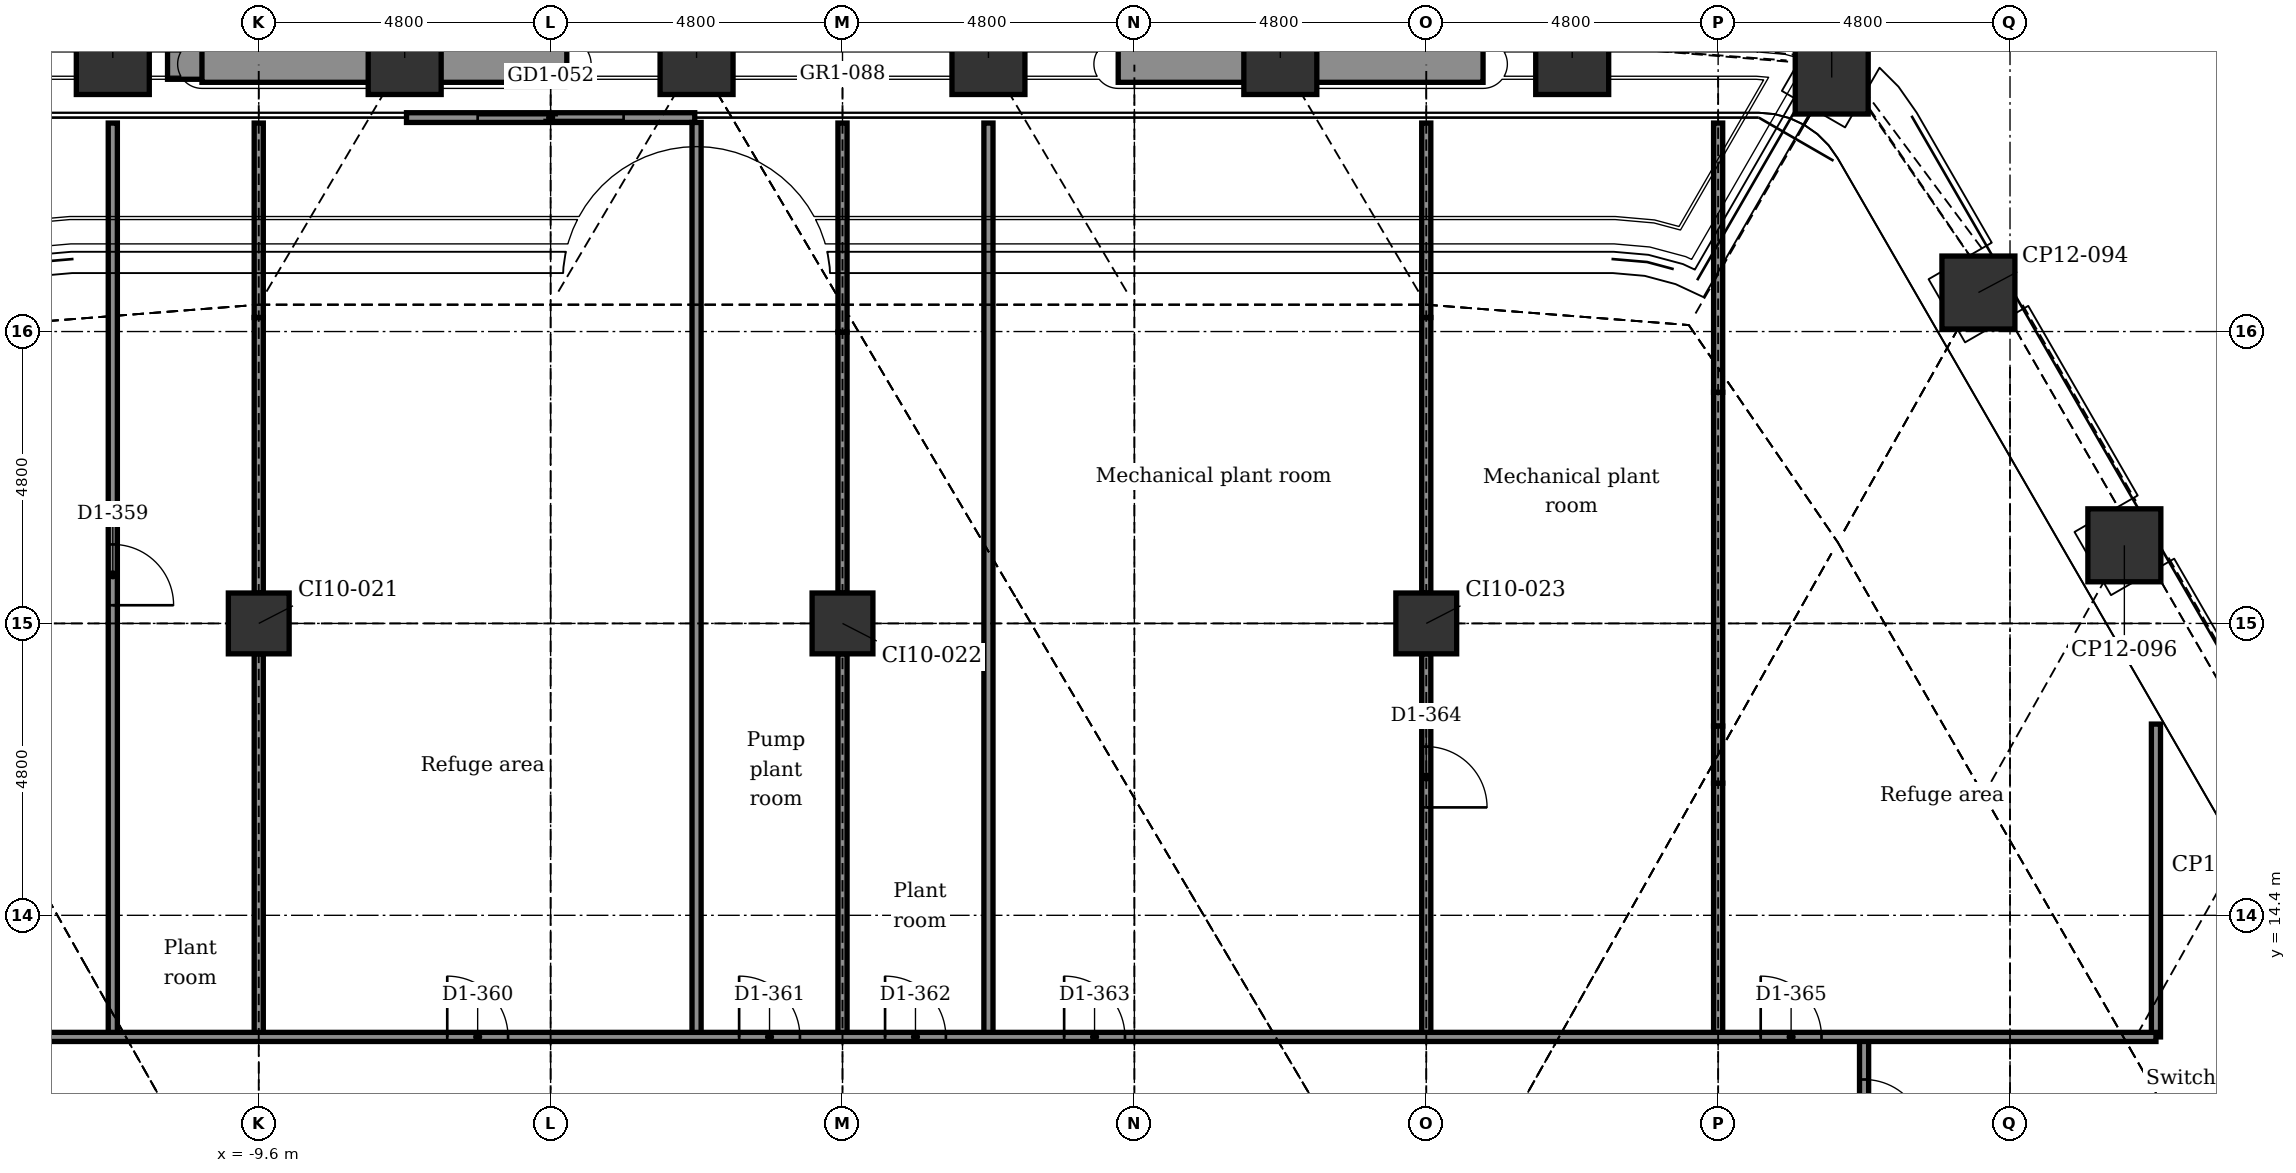
"""IFC4 building model, lengths in metres.
Left out: names, types, materials, properties, quantities, classifications, styles, units other than length and angle.
Written with IfcOpenShell. Run it as: python <this file> out.ifc"""

import sys

from ifc_helpers import new_model, si_unit, direction, frame, frame_2d, origin, origin_2d, place, context, subcontext, project, spatial, rectangle, extrude, element, fill, save


model = new_model("IFC4")
c1 = context("Model", 3, precision=1e-05, world=origin(), true_north=direction((0.0, 1.0)))
c2 = subcontext(c1, "Body", "Model", "MODEL_VIEW")
j1 = project(units=[si_unit("LENGTHUNIT", "METRE"), si_unit("PLANEANGLEUNIT", "RADIAN")], contexts=[c1])
p1 = place(None, origin())
s1 = spatial("IfcSite", under=j1, at=p1, CompositionType="ELEMENT")
p2 = place(p1, origin())
s2 = spatial("IfcBuilding", under=s1, at=p2, CompositionType="ELEMENT")
p3 = place(p2, frame((0.0, 0.0, 127.4)))
s3 = spatial("IfcBuildingStorey", under=s2, at=p3, CompositionType="ELEMENT", Elevation=127.4)
for number, where, z_axis, x_axis in (
    (1, (-12.0, 28.499, -0.3), (0.0, 0.0, 1.0), (1.0, 0.0, 0.0)),
    (2, (-7.2, 28.499, -0.3), (0.0, 0.0, 1.0), (1.0, 0.0, 0.0)),
    (3, (-2.4, 28.499, -0.3), (0.0, 0.0, 1.0), (1.0, 0.0, 0.0)),
    (4, (2.4, 28.499, -0.3), (0.0, 0.0, 1.0), (1.0, 0.0, 0.0)),
    (5, (7.2, 28.499, -0.3), (0.0, 0.0, 1.0), (1.0, 0.0, 0.0)),
    (6, (12.0, 28.499, -0.3), (0.0, 0.0, 1.0), (1.0, 0.0, 0.0)),
    (7, (16.268, 28.177, -0.3), (0.0, 0.0, 1.0), (0.5, 0.866, 0.0)),
    (8, (18.68, 24.642, -0.3), (0.0, 0.0, 1.0), (0.866, 0.5, 0.0)),
    (9, (21.08, 20.485, -0.3), (0.0, 0.0, 1.0), (0.866, 0.5, 0.0)),
):
    element("IfcColumn", number, at=place(p3, frame(where, z_axis=z_axis, x_axis=x_axis)), inside=s3, PredefinedType="COLUMN", context=c2, shape_type="SweptSolid", body=[
        extrude(rectangle(XDim=1.2, YDim=1.2, at=origin_2d()), origin(), (0.0, 0.0, 1.0), 6.15),
    ])
for number, where, z_axis, x_axis in (
    (10, (-9.6, 19.2, -0.3), (0.0, 0.0, 1.0), (1.0, 0.0, 0.0)),
    (11, (0.0, 19.2, -0.3), (0.0, 0.0, 1.0), (1.0, 0.0, 0.0)),
    (12, (9.6, 19.2, -0.3), (0.0, 0.0, 1.0), (1.0, 0.0, 0.0)),
):
    element("IfcColumn", number, at=place(p3, frame(where, z_axis=z_axis, x_axis=x_axis)), inside=s3, PredefinedType="COLUMN", context=c2, shape_type="SweptSolid", body=[
        extrude(rectangle(XDim=1.0, YDim=1.0, at=origin_2d()), origin(), (0.0, 0.0, 1.0), 6.15),
    ])
p4 = place(p3, frame((-7.17, 27.519, 0.0), z_axis=(0.0, 0.0, 1.0), x_axis=(1.0, 0.0, 0.0)))
e13 = element("IfcWall", 13, at=p4, inside=s3, PredefinedType="PARTITIONING", context=c2, shape_type="SweptSolid", body=[
    extrude(rectangle(XDim=4.74, YDim=0.16, at=frame_2d((2.37, 0.0))), origin(), (0.0, 0.0, 1.0), 5.7),
])
p5 = place(p4, frame((1.17, 0.0, 0.0)))
e14 = element("IfcOpeningElement", 14, at=p5, cuts=e13, PredefinedType="OPENING", context=c2, shape_type="SweptSolid", body=[
    extrude(rectangle(XDim=2.4, YDim=2.4, at=frame_2d((1.2, 1.2))), frame((0.0, 0.09, 0.0), z_axis=(0.0, -1.0, 0.0), x_axis=(1.0, 0.0, 0.0)), (0.0, 0.0, 1.0), 0.18),
])
p6 = place(p3, frame((-11.1, 28.448, 0.0), z_axis=(0.0, 0.0, 1.0), x_axis=(1.0, 0.0, 0.0)))
e15 = element("IfcWall", 15, at=p6, inside=s3, PredefinedType="USERDEFINED", context=c2, shape_type="SweptSolid", body=[
    extrude(rectangle(XDim=3.0, YDim=0.6, at=frame_2d((1.5, 0.0))), origin(), (0.0, 0.0, 1.0), 0.7),
])
for number, where, z_axis, x_axis in (
    (16, (-10.534, 28.398, 6.0), (0.0, 0.0, 1.0), (1.0, 0.0, 0.0)),
    (17, (4.534, 28.398, 6.0), (0.0, 0.0, 1.0), (1.0, 0.0, 0.0)),
):
    element("IfcWall", number, at=place(p3, frame(where, z_axis=z_axis, x_axis=x_axis)), inside=s3, PredefinedType="USERDEFINED", context=c2, shape_type="SweptSolid", body=[
        extrude(rectangle(XDim=6.0, YDim=0.6, at=frame_2d((3.0, 0.0))), origin(), (0.0, 0.0, 1.0), 0.7),
    ])
p7 = place(p3, frame((21.6, 12.4, 0.0), z_axis=(0.0, 0.0, 1.0), x_axis=(0.0, 1.0, 0.0)))
e18 = element("IfcWall", 18, at=p7, inside=s3, PredefinedType="PARTITIONING", context=c2, shape_type="SweptSolid", body=[
    extrude(rectangle(XDim=5.145, YDim=0.15, at=frame_2d((2.572, 0.0))), origin(), (0.0, 0.0, 1.0), 5.85),
])
p8 = place(p3, frame((16.8, 3.95, 0.0), z_axis=(0.0, 0.0, 1.0), x_axis=(0.0, 1.0, 0.0)))
e19 = element("IfcWall", 19, at=p8, inside=s3, PredefinedType="PARTITIONING", context=c2, shape_type="SweptSolid", body=[
    extrude(rectangle(XDim=8.45, YDim=0.15, at=frame_2d((4.225, 0.0))), origin(), (0.0, 0.0, 1.0), 5.85),
])
p9 = place(p8, frame((2.25, 0.0, 0.0)))
e20 = element("IfcOpeningElement", 20, at=p9, cuts=e19, PredefinedType="OPENING", context=c2, shape_type="SweptSolid", body=[
    extrude(rectangle(XDim=1.0, YDim=2.1, at=frame_2d((0.5, 1.05))), frame((0.0, 0.085, 0.0), z_axis=(0.0, -1.0, 0.0), x_axis=(1.0, 0.0, 0.0)), (0.0, 0.0, 1.0), 0.17),
])
p10 = place(p8, frame((6.75, 0.0, 0.0)))
e21 = element("IfcOpeningElement", 21, at=p10, cuts=e19, PredefinedType="OPENING", context=c2, shape_type="SweptSolid", body=[
    extrude(rectangle(XDim=1.0, YDim=2.1, at=frame_2d((0.5, 1.05))), frame((0.0, 0.085, 0.0), z_axis=(0.0, -1.0, 0.0), x_axis=(1.0, 0.0, 0.0)), (0.0, 0.0, 1.0), 0.17),
])
p11 = place(p3, frame((14.4, 17.512, 0.0), z_axis=(0.0, 0.0, 1.0), x_axis=(0.0, 1.0, 0.0)))
e22 = element("IfcWall", 22, at=p11, inside=s3, PredefinedType="PARTITIONING", context=c2, shape_type="SweptSolid", body=[
    extrude(rectangle(XDim=5.489, YDim=0.15, at=frame_2d((2.745, 0.0))), origin(), (0.0, 0.0, 1.0), 5.54),
])
p12 = place(p3, frame((14.4, 12.4, 0.0), z_axis=(0.0, 0.0, 1.0), x_axis=(0.0, 1.0, 0.0)))
e23 = element("IfcWall", 23, at=p12, inside=s3, PredefinedType="PARTITIONING", context=c2, shape_type="SweptSolid", body=[
    extrude(rectangle(XDim=4.173, YDim=0.15, at=frame_2d((2.087, 0.0))), origin(), (0.0, 0.0, 1.0), 5.54),
])
p13 = place(p3, frame((14.4, 16.573, 0.0), z_axis=(0.0, 0.0, 1.0), x_axis=(0.0, 1.0, 0.0)))
e24 = element("IfcWall", 24, at=p13, inside=s3, PredefinedType="PARTITIONING", context=c2, shape_type="SweptSolid", body=[
    extrude(rectangle(XDim=0.939, YDim=0.15, at=frame_2d((0.469, 0.0))), origin(), (0.0, 0.0, 1.0), 5.7),
])
p14 = place(p3, frame((14.4, 23.001, 0.0), z_axis=(0.0, 0.0, 1.0), x_axis=(0.0, 1.0, 0.0)))
e25 = element("IfcWall", 25, at=p14, inside=s3, PredefinedType="PARTITIONING", context=c2, shape_type="SweptSolid", body=[
    extrude(rectangle(XDim=4.427, YDim=0.15, at=frame_2d((2.213, 0.0))), origin(), (0.0, 0.0, 1.0), 5.7),
])
p15 = place(p3, frame((9.6, 12.4, 0.0), z_axis=(0.0, 0.0, 1.0), x_axis=(0.0, 1.0, 0.0)))
e26 = element("IfcWall", 26, at=p15, inside=s3, PredefinedType="PARTITIONING", context=c2, shape_type="SweptSolid", body=[
    extrude(rectangle(XDim=6.3, YDim=0.15, at=frame_2d((3.15, 0.0))), origin(), (0.0, 0.0, 1.0), 5.443),
])
p16 = place(p15, frame((3.775, 0.0, 0.0)))
e27 = element("IfcOpeningElement", 27, at=p16, cuts=e26, PredefinedType="OPENING", context=c2, shape_type="SweptSolid", body=[
    extrude(rectangle(XDim=1.0, YDim=2.1, at=frame_2d((0.5, 1.05))), frame((0.0, 0.085, 0.0), z_axis=(0.0, -1.0, 0.0), x_axis=(1.0, 0.0, 0.0)), (0.0, 0.0, 1.0), 0.17),
])
p17 = place(p3, frame((9.6, 19.7, 0.0), z_axis=(0.0, 0.0, 1.0), x_axis=(0.0, 1.0, 0.0)))
e28 = element("IfcWall", 28, at=p17, inside=s3, PredefinedType="PARTITIONING", context=c2, shape_type="SweptSolid", body=[
    extrude(rectangle(XDim=4.531, YDim=0.15, at=frame_2d((2.265, 0.0))), origin(), (0.0, 0.0, 1.0), 5.54),
])
p18 = place(p3, frame((9.6, 24.231, 0.0), z_axis=(0.0, 0.0, 1.0), x_axis=(0.0, 1.0, 0.0)))
e29 = element("IfcWall", 29, at=p18, inside=s3, PredefinedType="PARTITIONING", context=c2, shape_type="SweptSolid", body=[
    extrude(rectangle(XDim=3.198, YDim=0.15, at=frame_2d((1.599, 0.0))), origin(), (0.0, 0.0, 1.0), 5.7),
])
p19 = place(p3, frame((2.4, 12.4, 0.0), z_axis=(0.0, 0.0, 1.0), x_axis=(0.0, 1.0, 0.0)))
e30 = element("IfcWall", 30, at=p19, inside=s3, PredefinedType="PARTITIONING", context=c2, shape_type="SweptSolid", body=[
    extrude(rectangle(XDim=15.029, YDim=0.15, at=frame_2d((7.514, 0.0))), origin(), (0.0, 0.0, 1.0), 5.7),
])
p20 = place(p3, frame((0.0, 12.4, 0.0), z_axis=(0.0, 0.0, 1.0), x_axis=(0.0, 1.0, 0.0)))
e31 = element("IfcWall", 31, at=p20, inside=s3, PredefinedType="PARTITIONING", context=c2, shape_type="SweptSolid", body=[
    extrude(rectangle(XDim=6.3, YDim=0.15, at=frame_2d((3.15, 0.0))), origin(), (0.0, 0.0, 1.0), 5.443),
])
p21 = place(p3, frame((0.0, 19.7, 0.0), z_axis=(0.0, 0.0, 1.0), x_axis=(0.0, 1.0, 0.0)))
e32 = element("IfcWall", 32, at=p21, inside=s3, PredefinedType="PARTITIONING", context=c2, shape_type="SweptSolid", body=[
    extrude(rectangle(XDim=4.291, YDim=0.15, at=frame_2d((2.145, 0.0))), origin(), (0.0, 0.0, 1.0), 5.54),
])
p22 = place(p3, frame((0.0, 23.99, 0.0), z_axis=(0.0, 0.0, 1.0), x_axis=(0.0, 1.0, 0.0)))
e33 = element("IfcWall", 33, at=p22, inside=s3, PredefinedType="PARTITIONING", context=c2, shape_type="SweptSolid", body=[
    extrude(rectangle(XDim=3.438, YDim=0.15, at=frame_2d((1.719, 0.0))), origin(), (0.0, 0.0, 1.0), 5.7),
])
p23 = place(p3, frame((-2.4, 12.4, 0.0), z_axis=(0.0, 0.0, 1.0), x_axis=(0.0, 1.0, 0.0)))
e34 = element("IfcWall", 34, at=p23, inside=s3, PredefinedType="PARTITIONING", context=c2, shape_type="SweptSolid", body=[
    extrude(rectangle(XDim=15.039, YDim=0.15, at=frame_2d((7.519, 0.0))), origin(), (0.0, 0.0, 1.0), 5.7),
])
p24 = place(p3, frame((-9.6, 12.4, 0.0), z_axis=(0.0, 0.0, 1.0), x_axis=(0.0, 1.0, 0.0)))
e35 = element("IfcWall", 35, at=p24, inside=s3, PredefinedType="PARTITIONING", context=c2, shape_type="SweptSolid", body=[
    extrude(rectangle(XDim=6.3, YDim=0.15, at=frame_2d((3.15, 0.0))), origin(), (0.0, 0.0, 1.0), 5.443),
])
p25 = place(p3, frame((-9.6, 19.7, 0.0), z_axis=(0.0, 0.0, 1.0), x_axis=(0.0, 1.0, 0.0)))
e36 = element("IfcWall", 36, at=p25, inside=s3, PredefinedType="PARTITIONING", context=c2, shape_type="SweptSolid", body=[
    extrude(rectangle(XDim=4.531, YDim=0.15, at=frame_2d((2.265, 0.0))), origin(), (0.0, 0.0, 1.0), 5.54),
])
p26 = place(p3, frame((-9.6, 24.231, 0.0), z_axis=(0.0, 0.0, 1.0), x_axis=(0.0, 1.0, 0.0)))
e37 = element("IfcWall", 37, at=p26, inside=s3, PredefinedType="PARTITIONING", context=c2, shape_type="SweptSolid", body=[
    extrude(rectangle(XDim=3.198, YDim=0.15, at=frame_2d((1.599, 0.0))), origin(), (0.0, 0.0, 1.0), 5.7),
])
p27 = place(p3, frame((-12.0, 12.4, 0.0), z_axis=(0.0, 0.0, 1.0), x_axis=(0.0, 1.0, 0.0)))
e38 = element("IfcWall", 38, at=p27, inside=s3, PredefinedType="PARTITIONING", context=c2, shape_type="SweptSolid", body=[
    extrude(rectangle(XDim=15.029, YDim=0.15, at=frame_2d((7.514, 0.0))), origin(), (0.0, 0.0, 1.0), 5.7),
])
p28 = place(p27, frame((7.099, 0.0, 0.0)))
e39 = element("IfcOpeningElement", 39, at=p28, cuts=e38, PredefinedType="OPENING", context=c2, shape_type="SweptSolid", body=[
    extrude(rectangle(XDim=1.0, YDim=2.1, at=frame_2d((0.5, 1.05))), frame((0.0, 0.085, 0.0), z_axis=(0.0, -1.0, 0.0), x_axis=(1.0, 0.0, 0.0)), (0.0, 0.0, 1.0), 0.17),
])
p29 = place(p3, frame((-21.6, 12.4, 0.0), z_axis=(0.0, 0.0, 1.0), x_axis=(1.0, 0.0, 0.0)))
e40 = element("IfcWall", 40, at=p29, inside=s3, PredefinedType="PARTITIONING", context=c2, shape_type="SweptSolid", body=[
    extrude(rectangle(XDim=43.2, YDim=0.15, at=frame_2d((21.6, 0.0))), origin(), (0.0, 0.0, 1.0), 5.85),
])
p30 = place(p29, frame((6.7, 0.0, 0.0)))
e41 = element("IfcOpeningElement", 41, at=p30, cuts=e40, PredefinedType="OPENING", context=c2, shape_type="SweptSolid", body=[
    extrude(rectangle(XDim=1.0, YDim=2.1, at=frame_2d((0.5, 1.05))), frame((0.0, 0.085, 0.0), z_axis=(0.0, -1.0, 0.0), x_axis=(1.0, 0.0, 0.0)), (0.0, 0.0, 1.0), 0.17),
])
p31 = place(p29, frame((15.1, 0.0, 0.0)))
e42 = element("IfcOpeningElement", 42, at=p31, cuts=e40, PredefinedType="OPENING", context=c2, shape_type="SweptSolid", body=[
    extrude(rectangle(XDim=1.0, YDim=2.1, at=frame_2d((0.5, 1.05))), frame((0.0, 0.085, 0.0), z_axis=(0.0, -1.0, 0.0), x_axis=(1.0, 0.0, 0.0)), (0.0, 0.0, 1.0), 0.17),
])
p32 = place(p29, frame((19.9, 0.0, 0.0)))
e43 = element("IfcOpeningElement", 43, at=p32, cuts=e40, PredefinedType="OPENING", context=c2, shape_type="SweptSolid", body=[
    extrude(rectangle(XDim=1.0, YDim=2.1, at=frame_2d((0.5, 1.05))), frame((0.0, 0.085, 0.0), z_axis=(0.0, -1.0, 0.0), x_axis=(1.0, 0.0, 0.0)), (0.0, 0.0, 1.0), 0.17),
])
p33 = place(p29, frame((22.3, 0.0, 0.0)))
e44 = element("IfcOpeningElement", 44, at=p33, cuts=e40, PredefinedType="OPENING", context=c2, shape_type="SweptSolid", body=[
    extrude(rectangle(XDim=1.0, YDim=2.1, at=frame_2d((0.5, 1.05))), frame((0.0, 0.085, 0.0), z_axis=(0.0, -1.0, 0.0), x_axis=(1.0, 0.0, 0.0)), (0.0, 0.0, 1.0), 0.17),
])
p34 = place(p29, frame((25.245, 0.0, 0.0)))
e45 = element("IfcOpeningElement", 45, at=p34, cuts=e40, PredefinedType="OPENING", context=c2, shape_type="SweptSolid", body=[
    extrude(rectangle(XDim=1.0, YDim=2.1, at=frame_2d((0.5, 1.05))), frame((0.0, 0.085, 0.0), z_axis=(0.0, -1.0, 0.0), x_axis=(1.0, 0.0, 0.0)), (0.0, 0.0, 1.0), 0.17),
])
p35 = place(p29, frame((36.7, 0.0, 0.0)))
e46 = element("IfcOpeningElement", 46, at=p35, cuts=e40, PredefinedType="OPENING", context=c2, shape_type="SweptSolid", body=[
    extrude(rectangle(XDim=1.0, YDim=2.1, at=frame_2d((0.5, 1.05))), frame((0.0, 0.085, 0.0), z_axis=(0.0, -1.0, 0.0), x_axis=(1.0, 0.0, 0.0)), (0.0, 0.0, 1.0), 0.17),
])
p36 = place(p5, origin())
e47 = element("IfcDoor", 47, at=p36, inside=s3, OperationType="DOUBLE_DOOR_SLIDING", PredefinedType="DOOR", context=c2, shape_type="SweptSolid", body=[
    extrude(rectangle(XDim=2.4, YDim=2.4, at=frame_2d((1.2, 1.2))), frame((0.0, 0.025, 0.0), z_axis=(0.0, -1.0, 0.0), x_axis=(1.0, 0.0, 0.0)), (0.0, 0.0, 1.0), 0.05),
])
fill(e14, e47)
p37 = place(p28, frame((1.0, 0.0, 0.0), z_axis=(0.0, 0.0, 1.0), x_axis=(-1.0, 0.0, 0.0)))
e48 = element("IfcDoor", 48, at=p37, inside=s3, OperationType="SINGLE_SWING_LEFT", PredefinedType="DOOR", context=c2, shape_type="SweptSolid", body=[
    extrude(rectangle(XDim=1.0, YDim=2.1, at=frame_2d((0.5, 1.05))), frame((0.0, 0.025, 0.0), z_axis=(0.0, -1.0, 0.0), x_axis=(1.0, 0.0, 0.0)), (0.0, 0.0, 1.0), 0.05),
])
fill(e39, e48)
p38 = place(p31, origin())
e49 = element("IfcDoor", 49, at=p38, inside=s3, OperationType="SINGLE_SWING_LEFT", PredefinedType="DOOR", context=c2, shape_type="SweptSolid", body=[
    extrude(rectangle(XDim=1.0, YDim=2.1, at=frame_2d((0.5, 1.05))), frame((0.0, 0.025, 0.0), z_axis=(0.0, -1.0, 0.0), x_axis=(1.0, 0.0, 0.0)), (0.0, 0.0, 1.0), 0.05),
])
fill(e42, e49)
p39 = place(p32, origin())
e50 = element("IfcDoor", 50, at=p39, inside=s3, OperationType="SINGLE_SWING_LEFT", PredefinedType="DOOR", context=c2, shape_type="SweptSolid", body=[
    extrude(rectangle(XDim=1.0, YDim=2.1, at=frame_2d((0.5, 1.05))), frame((0.0, 0.025, 0.0), z_axis=(0.0, -1.0, 0.0), x_axis=(1.0, 0.0, 0.0)), (0.0, 0.0, 1.0), 0.05),
])
fill(e43, e50)
p40 = place(p33, origin())
e51 = element("IfcDoor", 51, at=p40, inside=s3, OperationType="SINGLE_SWING_LEFT", PredefinedType="DOOR", context=c2, shape_type="SweptSolid", body=[
    extrude(rectangle(XDim=1.0, YDim=2.1, at=frame_2d((0.5, 1.05))), frame((0.0, 0.025, 0.0), z_axis=(0.0, -1.0, 0.0), x_axis=(1.0, 0.0, 0.0)), (0.0, 0.0, 1.0), 0.05),
])
fill(e44, e51)
p41 = place(p34, origin())
e52 = element("IfcDoor", 52, at=p41, inside=s3, OperationType="SINGLE_SWING_LEFT", PredefinedType="DOOR", context=c2, shape_type="SweptSolid", body=[
    extrude(rectangle(XDim=1.0, YDim=2.1, at=frame_2d((0.5, 1.05))), frame((0.0, 0.025, 0.0), z_axis=(0.0, -1.0, 0.0), x_axis=(1.0, 0.0, 0.0)), (0.0, 0.0, 1.0), 0.05),
])
fill(e45, e52)
p42 = place(p16, frame((1.0, 0.0, 0.0), z_axis=(0.0, 0.0, 1.0), x_axis=(-1.0, 0.0, 0.0)))
e53 = element("IfcDoor", 53, at=p42, inside=s3, OperationType="SINGLE_SWING_LEFT", PredefinedType="DOOR", context=c2, shape_type="SweptSolid", body=[
    extrude(rectangle(XDim=1.0, YDim=2.1, at=frame_2d((0.5, 1.05))), frame((0.0, 0.025, 0.0), z_axis=(0.0, -1.0, 0.0), x_axis=(1.0, 0.0, 0.0)), (0.0, 0.0, 1.0), 0.05),
])
fill(e27, e53)
p43 = place(p35, origin())
e54 = element("IfcDoor", 54, at=p43, inside=s3, OperationType="SINGLE_SWING_LEFT", PredefinedType="DOOR", context=c2, shape_type="SweptSolid", body=[
    extrude(rectangle(XDim=1.0, YDim=2.1, at=frame_2d((0.5, 1.05))), frame((0.0, 0.025, 0.0), z_axis=(0.0, -1.0, 0.0), x_axis=(1.0, 0.0, 0.0)), (0.0, 0.0, 1.0), 0.05),
])
fill(e46, e54)
p44 = place(p10, frame((1.0, 0.0, 0.0), z_axis=(0.0, 0.0, 1.0), x_axis=(-1.0, 0.0, 0.0)))
e55 = element("IfcDoor", 55, at=p44, inside=s3, OperationType="SINGLE_SWING_LEFT", PredefinedType="DOOR", context=c2, shape_type="SweptSolid", body=[
    extrude(rectangle(XDim=1.0, YDim=2.1, at=frame_2d((0.5, 1.05))), frame((0.0, 0.025, 0.0), z_axis=(0.0, -1.0, 0.0), x_axis=(1.0, 0.0, 0.0)), (0.0, 0.0, 1.0), 0.05),
])
fill(e21, e55)
save(model, sys.argv[1])
